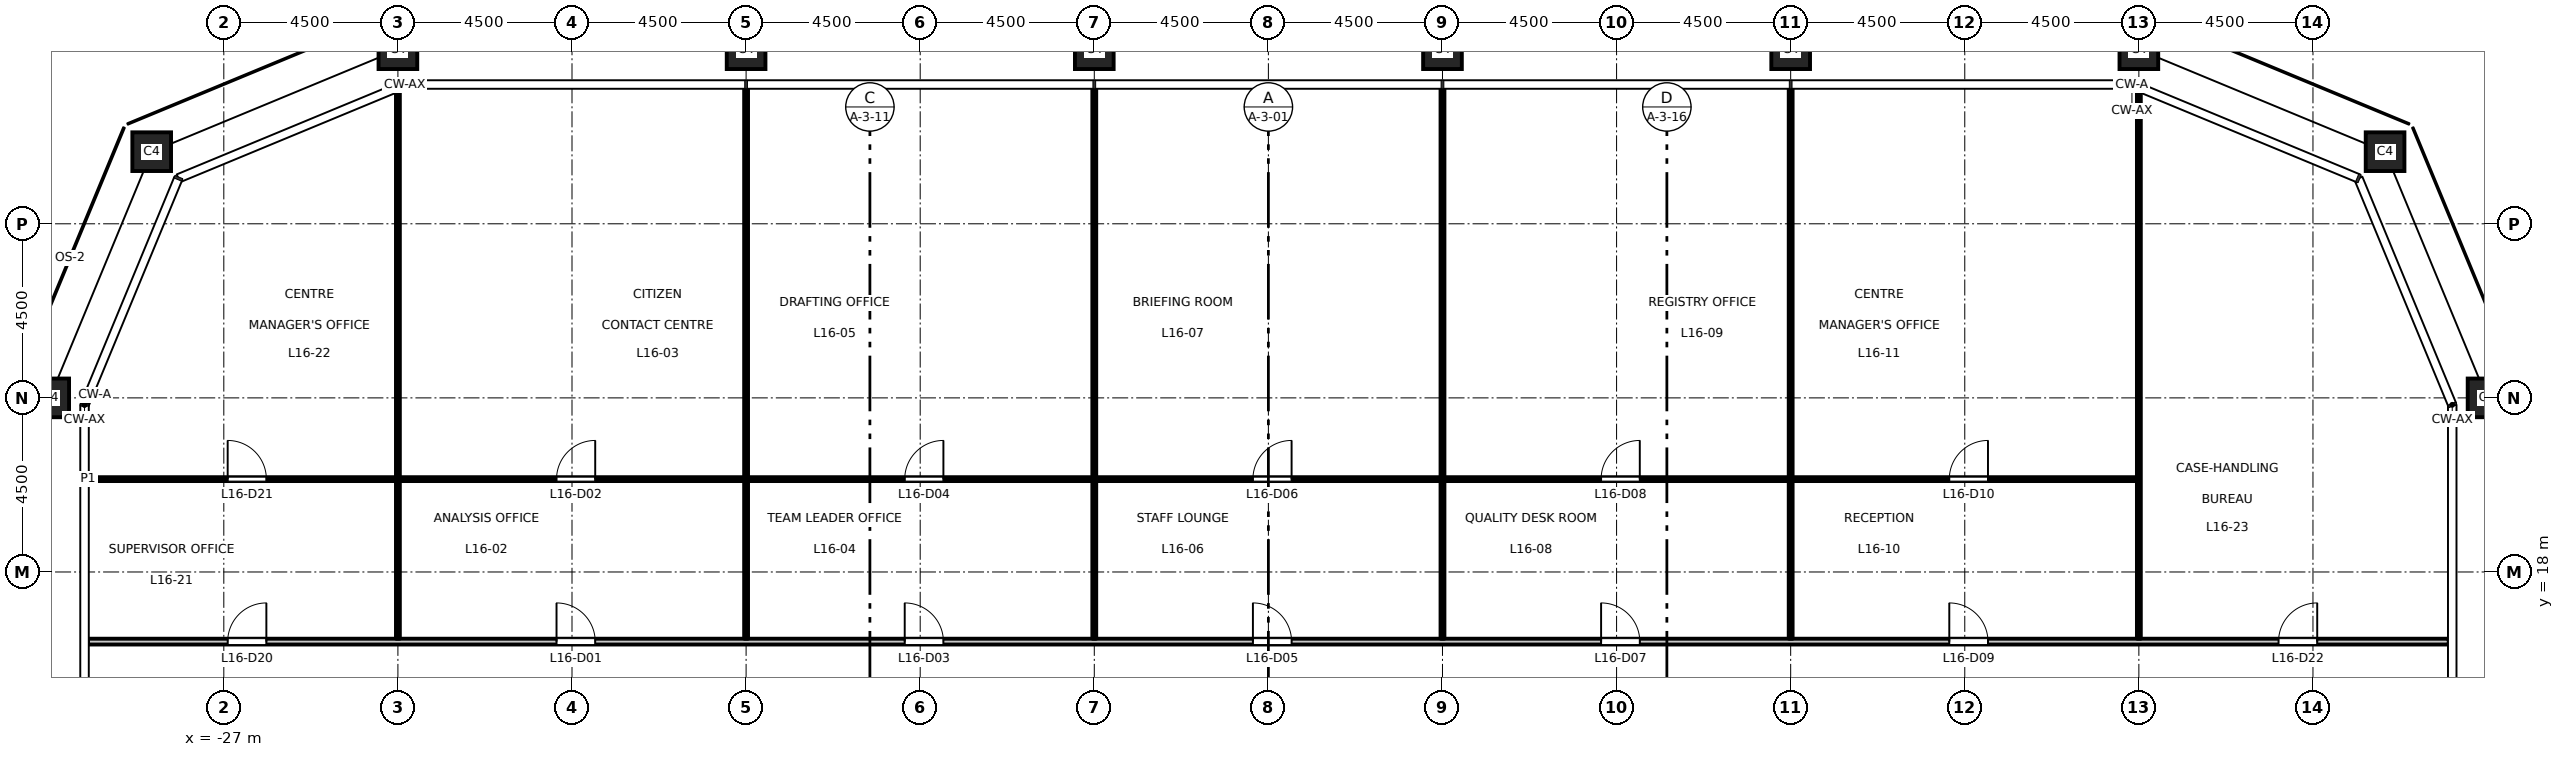
"""IFC4 building model, lengths in metres.
Left out: names, types, materials, properties, quantities, classifications, styles, units other than length and angle.
Written with IfcOpenShell. Run it as: python <this file> out.ifc"""

import sys

from ifc_helpers import new_model, si_unit, direction, frame, frame_2d, origin, origin_2d, place, context, subcontext, project, spatial, rectangle, hollow_rectangle, extrude, element, fill, save


model = new_model("IFC4")
c1 = context("Model", 3, precision=1e-05, world=origin(), true_north=direction((0.0, 1.0)))
c2 = subcontext(c1, "Body", "Model", "MODEL_VIEW")
j1 = project(units=[si_unit("LENGTHUNIT", "METRE"), si_unit("PLANEANGLEUNIT", "RADIAN")], contexts=[c1])
p1 = place(None, origin())
s1 = spatial("IfcSite", under=j1, at=p1, CompositionType="ELEMENT")
p2 = place(p1, origin())
s2 = spatial("IfcBuilding", under=s1, at=p2, CompositionType="ELEMENT")
p3 = place(p2, frame((0.0, 0.0, 76.2)))
s3 = spatial("IfcBuildingStorey", under=s2, at=p3, CompositionType="ELEMENT", Elevation=76.2)
for number, where, z_axis, x_axis in (
    (1, (31.5, 22.5, 0.0), (0.0, 0.0, 1.0), (1.0, 0.0, 0.0)),
    (2, (28.864, 28.864, 0.0), (0.0, 0.0, 1.0), (1.0, 0.0, 0.0)),
    (3, (22.5, 31.5, 0.0), (0.0, 0.0, 1.0), (1.0, 0.0, 0.0)),
    (4, (13.5, 31.5, 0.0), (0.0, 0.0, 1.0), (1.0, 0.0, 0.0)),
    (5, (4.5, 31.5, 0.0), (0.0, 0.0, 1.0), (1.0, 0.0, 0.0)),
    (6, (-4.5, 31.5, 0.0), (0.0, 0.0, 1.0), (1.0, 0.0, 0.0)),
    (7, (-13.5, 31.5, 0.0), (0.0, 0.0, 1.0), (1.0, 0.0, 0.0)),
    (8, (-22.5, 31.5, 0.0), (0.0, 0.0, 1.0), (1.0, 0.0, 0.0)),
    (9, (-28.864, 28.864, 0.0), (0.0, 0.0, 1.0), (1.0, 0.0, 0.0)),
    (10, (-31.5, 22.5, 0.0), (0.0, 0.0, 1.0), (1.0, 0.0, 0.0)),
):
    element("IfcColumn", number, at=place(p3, frame(where, z_axis=z_axis, x_axis=x_axis)), inside=s3, PredefinedType="COLUMN", context=c2, shape_type="SweptSolid", body=[
        extrude(hollow_rectangle(XDim=1.0, YDim=1.0, WallThickness=0.06, at=origin_2d()), origin(), (0.0, 0.0, 1.0), 4.5),
    ])
p4 = place(p3, frame((-30.51, 16.2, 0.0), z_axis=(0.0, 0.0, 1.0), x_axis=(1.0, 0.0, 0.0)))
e11 = element("IfcWall", 11, at=p4, inside=s3, PredefinedType="PARTITIONING", context=c2, shape_type="SweptSolid", body=[
    extrude(rectangle(XDim=61.02, YDim=0.15, at=frame_2d((30.51, 0.0))), origin(), (0.0, 0.0, 1.0), 4.35),
])
p5 = place(p4, frame((12.11, 0.0, 0.0)))
e12 = element("IfcOpeningElement", 12, at=p5, cuts=e11, PredefinedType="OPENING", context=c2, shape_type="SweptSolid", body=[
    extrude(rectangle(XDim=1.0, YDim=2.1, at=frame_2d((0.5, 1.05))), frame((0.0, 0.085, 0.0), z_axis=(0.0, -1.0, 0.0), x_axis=(1.0, 0.0, 0.0)), (0.0, 0.0, 1.0), 0.17),
])
p6 = place(p4, frame((21.11, 0.0, 0.0)))
e13 = element("IfcOpeningElement", 13, at=p6, cuts=e11, PredefinedType="OPENING", context=c2, shape_type="SweptSolid", body=[
    extrude(rectangle(XDim=1.0, YDim=2.1, at=frame_2d((0.5, 1.05))), frame((0.0, 0.085, 0.0), z_axis=(0.0, -1.0, 0.0), x_axis=(1.0, 0.0, 0.0)), (0.0, 0.0, 1.0), 0.17),
])
p7 = place(p4, frame((30.11, 0.0, 0.0)))
e14 = element("IfcOpeningElement", 14, at=p7, cuts=e11, PredefinedType="OPENING", context=c2, shape_type="SweptSolid", body=[
    extrude(rectangle(XDim=1.0, YDim=2.1, at=frame_2d((0.5, 1.05))), frame((0.0, 0.085, 0.0), z_axis=(0.0, -1.0, 0.0), x_axis=(1.0, 0.0, 0.0)), (0.0, 0.0, 1.0), 0.17),
])
p8 = place(p4, frame((39.11, 0.0, 0.0)))
e15 = element("IfcOpeningElement", 15, at=p8, cuts=e11, PredefinedType="OPENING", context=c2, shape_type="SweptSolid", body=[
    extrude(rectangle(XDim=1.0, YDim=2.1, at=frame_2d((0.5, 1.05))), frame((0.0, 0.085, 0.0), z_axis=(0.0, -1.0, 0.0), x_axis=(1.0, 0.0, 0.0)), (0.0, 0.0, 1.0), 0.17),
])
p9 = place(p4, frame((48.11, 0.0, 0.0)))
e16 = element("IfcOpeningElement", 16, at=p9, cuts=e11, PredefinedType="OPENING", context=c2, shape_type="SweptSolid", body=[
    extrude(rectangle(XDim=1.0, YDim=2.1, at=frame_2d((0.5, 1.05))), frame((0.0, 0.085, 0.0), z_axis=(0.0, -1.0, 0.0), x_axis=(1.0, 0.0, 0.0)), (0.0, 0.0, 1.0), 0.17),
])
p10 = place(p4, frame((3.61, 0.0, 0.0)))
e17 = element("IfcOpeningElement", 17, at=p10, cuts=e11, PredefinedType="OPENING", context=c2, shape_type="SweptSolid", body=[
    extrude(rectangle(XDim=1.0, YDim=2.1, at=frame_2d((0.5, 1.05))), frame((0.0, 0.085, 0.0), z_axis=(0.0, -1.0, 0.0), x_axis=(1.0, 0.0, 0.0)), (0.0, 0.0, 1.0), 0.17),
])
p11 = place(p4, frame((56.62, 0.0, 0.0)))
e18 = element("IfcOpeningElement", 18, at=p11, cuts=e11, PredefinedType="OPENING", context=c2, shape_type="SweptSolid", body=[
    extrude(rectangle(XDim=1.0, YDim=2.1, at=frame_2d((0.5, 1.05))), frame((0.0, 0.085, 0.0), z_axis=(0.0, -1.0, 0.0), x_axis=(1.0, 0.0, 0.0)), (0.0, 0.0, 1.0), 0.17),
])
p12 = place(p3, frame((-30.51, 20.4, 0.0), z_axis=(0.0, 0.0, 1.0), x_axis=(1.0, 0.0, 0.0)))
e19 = element("IfcWall", 19, at=p12, inside=s3, PredefinedType="PARTITIONING", context=c2, shape_type="SweptSolid", body=[
    extrude(rectangle(XDim=52.96, YDim=0.1, at=frame_2d((26.48, 0.0))), origin(), (0.0, 0.0, 1.0), 4.35),
])
p13 = place(p12, frame((12.11, 0.0, 0.0)))
e20 = element("IfcOpeningElement", 20, at=p13, cuts=e19, PredefinedType="OPENING", context=c2, shape_type="SweptSolid", body=[
    extrude(rectangle(XDim=1.0, YDim=2.1, at=frame_2d((0.5, 1.05))), frame((0.0, 0.06, 0.0), z_axis=(0.0, -1.0, 0.0), x_axis=(1.0, 0.0, 0.0)), (0.0, 0.0, 1.0), 0.12),
])
p14 = place(p12, frame((21.11, 0.0, 0.0)))
e21 = element("IfcOpeningElement", 21, at=p14, cuts=e19, PredefinedType="OPENING", context=c2, shape_type="SweptSolid", body=[
    extrude(rectangle(XDim=1.0, YDim=2.1, at=frame_2d((0.5, 1.05))), frame((0.0, 0.06, 0.0), z_axis=(0.0, -1.0, 0.0), x_axis=(1.0, 0.0, 0.0)), (0.0, 0.0, 1.0), 0.12),
])
p15 = place(p12, frame((30.11, 0.0, 0.0)))
e22 = element("IfcOpeningElement", 22, at=p15, cuts=e19, PredefinedType="OPENING", context=c2, shape_type="SweptSolid", body=[
    extrude(rectangle(XDim=1.0, YDim=2.1, at=frame_2d((0.5, 1.05))), frame((0.0, 0.06, 0.0), z_axis=(0.0, -1.0, 0.0), x_axis=(1.0, 0.0, 0.0)), (0.0, 0.0, 1.0), 0.12),
])
p16 = place(p12, frame((39.11, 0.0, 0.0)))
e23 = element("IfcOpeningElement", 23, at=p16, cuts=e19, PredefinedType="OPENING", context=c2, shape_type="SweptSolid", body=[
    extrude(rectangle(XDim=1.0, YDim=2.1, at=frame_2d((0.5, 1.05))), frame((0.0, 0.06, 0.0), z_axis=(0.0, -1.0, 0.0), x_axis=(1.0, 0.0, 0.0)), (0.0, 0.0, 1.0), 0.12),
])
p17 = place(p12, frame((48.11, 0.0, 0.0)))
e24 = element("IfcOpeningElement", 24, at=p17, cuts=e19, PredefinedType="OPENING", context=c2, shape_type="SweptSolid", body=[
    extrude(rectangle(XDim=1.0, YDim=2.1, at=frame_2d((0.5, 1.05))), frame((0.0, 0.06, 0.0), z_axis=(0.0, -1.0, 0.0), x_axis=(1.0, 0.0, 0.0)), (0.0, 0.0, 1.0), 0.12),
])
p18 = place(p12, frame((3.61, 0.0, 0.0)))
e25 = element("IfcOpeningElement", 25, at=p18, cuts=e19, PredefinedType="OPENING", context=c2, shape_type="SweptSolid", body=[
    extrude(rectangle(XDim=1.0, YDim=2.1, at=frame_2d((0.5, 1.05))), frame((0.0, 0.06, 0.0), z_axis=(0.0, -1.0, 0.0), x_axis=(1.0, 0.0, 0.0)), (0.0, 0.0, 1.0), 0.12),
])
p19 = place(p3, frame((-22.5, 16.275, 0.0), z_axis=(0.0, 0.0, 1.0), x_axis=(0.0, 1.0, 0.0)))
e26 = element("IfcWall", 26, at=p19, inside=s3, PredefinedType="PARTITIONING", context=c2, shape_type="SweptSolid", body=[
    extrude(rectangle(XDim=4.075, YDim=0.1, at=frame_2d((2.038, 0.0))), origin(), (0.0, 0.0, 1.0), 3.35),
])
p20 = place(p3, frame((-22.5, 20.45, 0.0), z_axis=(0.0, 0.0, 1.0), x_axis=(0.0, 1.0, 0.0)))
e27 = element("IfcWall", 27, at=p20, inside=s3, PredefinedType="PARTITIONING", context=c2, shape_type="SweptSolid", body=[
    extrude(rectangle(XDim=9.978, YDim=0.1, at=frame_2d((4.989, 0.0))), origin(), (0.0, 0.0, 1.0), 3.35),
])
p21 = place(p3, frame((-13.5, 16.275, 0.0), z_axis=(0.0, 0.0, 1.0), x_axis=(0.0, 1.0, 0.0)))
e28 = element("IfcWall", 28, at=p21, inside=s3, PredefinedType="PARTITIONING", context=c2, shape_type="SweptSolid", body=[
    extrude(rectangle(XDim=4.075, YDim=0.1, at=frame_2d((2.038, 0.0))), origin(), (0.0, 0.0, 1.0), 3.35),
])
p22 = place(p3, frame((-13.5, 20.45, 0.0), z_axis=(0.0, 0.0, 1.0), x_axis=(0.0, 1.0, 0.0)))
e29 = element("IfcWall", 29, at=p22, inside=s3, PredefinedType="PARTITIONING", context=c2, shape_type="SweptSolid", body=[
    extrude(rectangle(XDim=10.06, YDim=0.1, at=frame_2d((5.03, 0.0))), origin(), (0.0, 0.0, 1.0), 3.35),
])
p23 = place(p3, frame((-4.5, 16.275, 0.0), z_axis=(0.0, 0.0, 1.0), x_axis=(0.0, 1.0, 0.0)))
e30 = element("IfcWall", 30, at=p23, inside=s3, PredefinedType="PARTITIONING", context=c2, shape_type="SweptSolid", body=[
    extrude(rectangle(XDim=4.075, YDim=0.1, at=frame_2d((2.038, 0.0))), origin(), (0.0, 0.0, 1.0), 3.35),
])
p24 = place(p3, frame((-4.5, 20.45, 0.0), z_axis=(0.0, 0.0, 1.0), x_axis=(0.0, 1.0, 0.0)))
e31 = element("IfcWall", 31, at=p24, inside=s3, PredefinedType="PARTITIONING", context=c2, shape_type="SweptSolid", body=[
    extrude(rectangle(XDim=10.06, YDim=0.1, at=frame_2d((5.03, 0.0))), origin(), (0.0, 0.0, 1.0), 3.35),
])
p25 = place(p3, frame((4.5, 16.275, 0.0), z_axis=(0.0, 0.0, 1.0), x_axis=(0.0, 1.0, 0.0)))
e32 = element("IfcWall", 32, at=p25, inside=s3, PredefinedType="PARTITIONING", context=c2, shape_type="SweptSolid", body=[
    extrude(rectangle(XDim=4.075, YDim=0.1, at=frame_2d((2.038, 0.0))), origin(), (0.0, 0.0, 1.0), 3.35),
])
p26 = place(p3, frame((4.5, 20.45, 0.0), z_axis=(0.0, 0.0, 1.0), x_axis=(0.0, 1.0, 0.0)))
e33 = element("IfcWall", 33, at=p26, inside=s3, PredefinedType="PARTITIONING", context=c2, shape_type="SweptSolid", body=[
    extrude(rectangle(XDim=10.06, YDim=0.1, at=frame_2d((5.03, 0.0))), origin(), (0.0, 0.0, 1.0), 3.35),
])
p27 = place(p3, frame((13.5, 16.275, 0.0), z_axis=(0.0, 0.0, 1.0), x_axis=(0.0, 1.0, 0.0)))
e34 = element("IfcWall", 34, at=p27, inside=s3, PredefinedType="PARTITIONING", context=c2, shape_type="SweptSolid", body=[
    extrude(rectangle(XDim=4.075, YDim=0.1, at=frame_2d((2.038, 0.0))), origin(), (0.0, 0.0, 1.0), 3.35),
])
p28 = place(p3, frame((13.5, 20.45, 0.0), z_axis=(0.0, 0.0, 1.0), x_axis=(0.0, 1.0, 0.0)))
e35 = element("IfcWall", 35, at=p28, inside=s3, PredefinedType="PARTITIONING", context=c2, shape_type="SweptSolid", body=[
    extrude(rectangle(XDim=10.06, YDim=0.1, at=frame_2d((5.03, 0.0))), origin(), (0.0, 0.0, 1.0), 3.35),
])
p29 = place(p3, frame((22.5, 16.275, 0.0), z_axis=(0.0, 0.0, 1.0), x_axis=(0.0, 1.0, 0.0)))
e36 = element("IfcWall", 36, at=p29, inside=s3, PredefinedType="PARTITIONING", context=c2, shape_type="SweptSolid", body=[
    extrude(rectangle(XDim=14.153, YDim=0.1, at=frame_2d((7.077, 0.0))), origin(), (0.0, 0.0, 1.0), 3.35),
])
p30 = place(p5, origin())
e37 = element("IfcDoor", 37, at=p30, inside=s3, OperationType="SINGLE_SWING_LEFT", PredefinedType="DOOR", context=c2, shape_type="SweptSolid", body=[
    extrude(rectangle(XDim=1.0, YDim=2.1, at=frame_2d((0.5, 1.05))), frame((0.0, 0.025, 0.0), z_axis=(0.0, -1.0, 0.0), x_axis=(1.0, 0.0, 0.0)), (0.0, 0.0, 1.0), 0.05),
])
fill(e12, e37)
p31 = place(p13, origin())
e38 = element("IfcDoor", 38, at=p31, inside=s3, OperationType="SINGLE_SWING_RIGHT", PredefinedType="DOOR", context=c2, shape_type="SweptSolid", body=[
    extrude(rectangle(XDim=1.0, YDim=2.1, at=frame_2d((0.5, 1.05))), frame((0.0, 0.025, 0.0), z_axis=(0.0, -1.0, 0.0), x_axis=(1.0, 0.0, 0.0)), (0.0, 0.0, 1.0), 0.05),
])
fill(e20, e38)
p32 = place(p6, origin())
e39 = element("IfcDoor", 39, at=p32, inside=s3, OperationType="SINGLE_SWING_LEFT", PredefinedType="DOOR", context=c2, shape_type="SweptSolid", body=[
    extrude(rectangle(XDim=1.0, YDim=2.1, at=frame_2d((0.5, 1.05))), frame((0.0, 0.025, 0.0), z_axis=(0.0, -1.0, 0.0), x_axis=(1.0, 0.0, 0.0)), (0.0, 0.0, 1.0), 0.05),
])
fill(e13, e39)
p33 = place(p14, origin())
e40 = element("IfcDoor", 40, at=p33, inside=s3, OperationType="SINGLE_SWING_RIGHT", PredefinedType="DOOR", context=c2, shape_type="SweptSolid", body=[
    extrude(rectangle(XDim=1.0, YDim=2.1, at=frame_2d((0.5, 1.05))), frame((0.0, 0.025, 0.0), z_axis=(0.0, -1.0, 0.0), x_axis=(1.0, 0.0, 0.0)), (0.0, 0.0, 1.0), 0.05),
])
fill(e21, e40)
p34 = place(p7, origin())
e41 = element("IfcDoor", 41, at=p34, inside=s3, OperationType="SINGLE_SWING_LEFT", PredefinedType="DOOR", context=c2, shape_type="SweptSolid", body=[
    extrude(rectangle(XDim=1.0, YDim=2.1, at=frame_2d((0.5, 1.05))), frame((0.0, 0.025, 0.0), z_axis=(0.0, -1.0, 0.0), x_axis=(1.0, 0.0, 0.0)), (0.0, 0.0, 1.0), 0.05),
])
fill(e14, e41)
p35 = place(p15, origin())
e42 = element("IfcDoor", 42, at=p35, inside=s3, OperationType="SINGLE_SWING_RIGHT", PredefinedType="DOOR", context=c2, shape_type="SweptSolid", body=[
    extrude(rectangle(XDim=1.0, YDim=2.1, at=frame_2d((0.5, 1.05))), frame((0.0, 0.025, 0.0), z_axis=(0.0, -1.0, 0.0), x_axis=(1.0, 0.0, 0.0)), (0.0, 0.0, 1.0), 0.05),
])
fill(e22, e42)
p36 = place(p8, origin())
e43 = element("IfcDoor", 43, at=p36, inside=s3, OperationType="SINGLE_SWING_LEFT", PredefinedType="DOOR", context=c2, shape_type="SweptSolid", body=[
    extrude(rectangle(XDim=1.0, YDim=2.1, at=frame_2d((0.5, 1.05))), frame((0.0, 0.025, 0.0), z_axis=(0.0, -1.0, 0.0), x_axis=(1.0, 0.0, 0.0)), (0.0, 0.0, 1.0), 0.05),
])
fill(e15, e43)
p37 = place(p16, origin())
e44 = element("IfcDoor", 44, at=p37, inside=s3, OperationType="SINGLE_SWING_RIGHT", PredefinedType="DOOR", context=c2, shape_type="SweptSolid", body=[
    extrude(rectangle(XDim=1.0, YDim=2.1, at=frame_2d((0.5, 1.05))), frame((0.0, 0.025, 0.0), z_axis=(0.0, -1.0, 0.0), x_axis=(1.0, 0.0, 0.0)), (0.0, 0.0, 1.0), 0.05),
])
fill(e23, e44)
p38 = place(p9, origin())
e45 = element("IfcDoor", 45, at=p38, inside=s3, OperationType="SINGLE_SWING_LEFT", PredefinedType="DOOR", context=c2, shape_type="SweptSolid", body=[
    extrude(rectangle(XDim=1.0, YDim=2.1, at=frame_2d((0.5, 1.05))), frame((0.0, 0.025, 0.0), z_axis=(0.0, -1.0, 0.0), x_axis=(1.0, 0.0, 0.0)), (0.0, 0.0, 1.0), 0.05),
])
fill(e16, e45)
p39 = place(p17, origin())
e46 = element("IfcDoor", 46, at=p39, inside=s3, OperationType="SINGLE_SWING_RIGHT", PredefinedType="DOOR", context=c2, shape_type="SweptSolid", body=[
    extrude(rectangle(XDim=1.0, YDim=2.1, at=frame_2d((0.5, 1.05))), frame((0.0, 0.025, 0.0), z_axis=(0.0, -1.0, 0.0), x_axis=(1.0, 0.0, 0.0)), (0.0, 0.0, 1.0), 0.05),
])
fill(e24, e46)
p40 = place(p10, origin())
e47 = element("IfcDoor", 47, at=p40, inside=s3, OperationType="SINGLE_SWING_RIGHT", PredefinedType="DOOR", context=c2, shape_type="SweptSolid", body=[
    extrude(rectangle(XDim=1.0, YDim=2.1, at=frame_2d((0.5, 1.05))), frame((0.0, 0.025, 0.0), z_axis=(0.0, -1.0, 0.0), x_axis=(1.0, 0.0, 0.0)), (0.0, 0.0, 1.0), 0.05),
])
fill(e17, e47)
p41 = place(p18, origin())
e48 = element("IfcDoor", 48, at=p41, inside=s3, OperationType="SINGLE_SWING_LEFT", PredefinedType="DOOR", context=c2, shape_type="SweptSolid", body=[
    extrude(rectangle(XDim=1.0, YDim=2.1, at=frame_2d((0.5, 1.05))), frame((0.0, 0.025, 0.0), z_axis=(0.0, -1.0, 0.0), x_axis=(1.0, 0.0, 0.0)), (0.0, 0.0, 1.0), 0.05),
])
fill(e25, e48)
p42 = place(p11, origin())
e49 = element("IfcDoor", 49, at=p42, inside=s3, OperationType="SINGLE_SWING_RIGHT", PredefinedType="DOOR", context=c2, shape_type="SweptSolid", body=[
    extrude(rectangle(XDim=1.0, YDim=2.1, at=frame_2d((0.5, 1.05))), frame((0.0, 0.025, 0.0), z_axis=(0.0, -1.0, 0.0), x_axis=(1.0, 0.0, 0.0)), (0.0, 0.0, 1.0), 0.05),
])
fill(e18, e49)
save(model, sys.argv[1])
